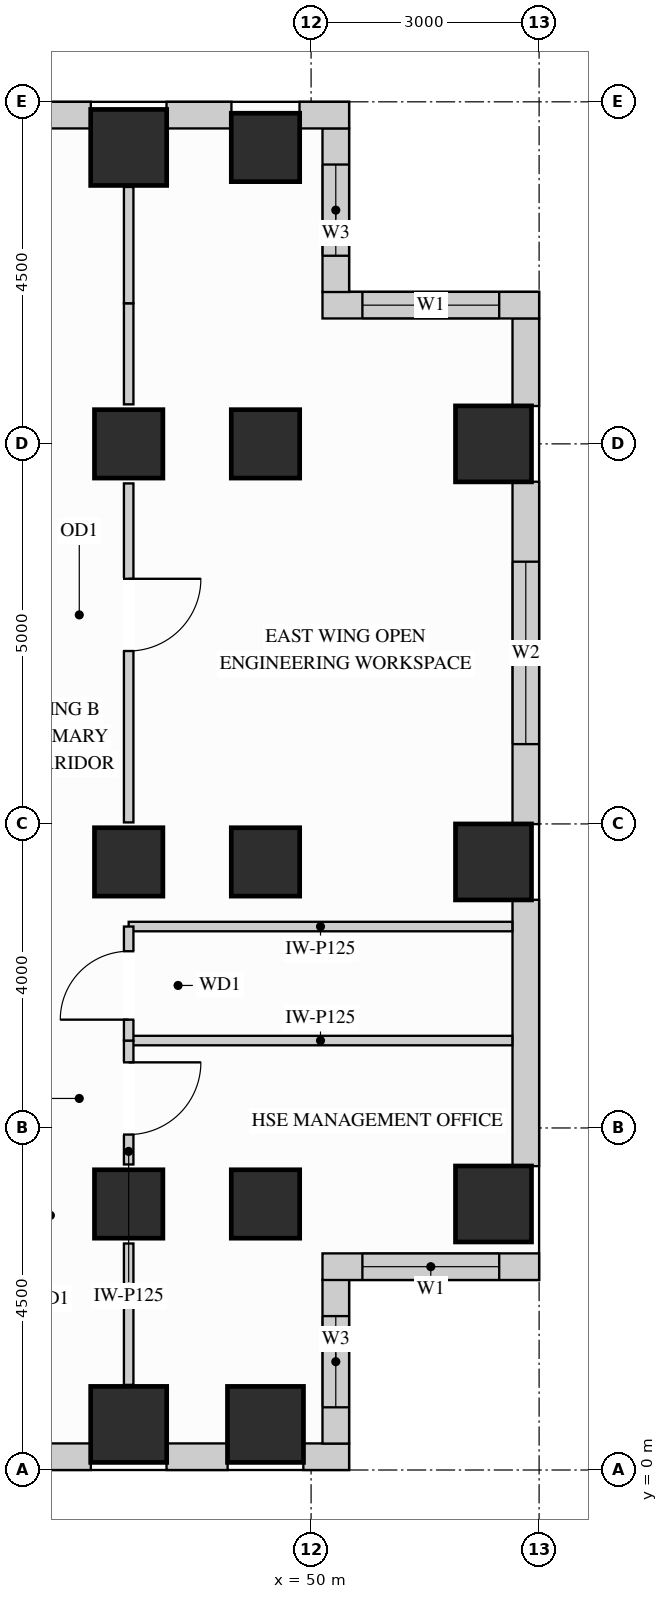
"""IFC4 building model, lengths in metres.
Left out: names, types, materials, properties, quantities, classifications, styles, units other than length and angle.
Written with IfcOpenShell. Run it as: python <this file> out.ifc"""

import sys

from ifc_helpers import new_model, si_unit, direction, frame, frame_2d, origin, origin_2d, place, context, subcontext, project, spatial, rectangle, extrude, source, transform, mapped, element, fill, save


model = new_model("IFC4")
c1 = context("Model", 3, precision=1e-05, world=origin(), true_north=direction((0.0, 1.0)))
c2 = subcontext(c1, "Body", "Model", "MODEL_VIEW")
j1 = project(units=[si_unit("LENGTHUNIT", "METRE"), si_unit("PLANEANGLEUNIT", "RADIAN")], contexts=[c1])
p1 = place(None, origin())
s1 = spatial("IfcSite", under=j1, at=p1, CompositionType="ELEMENT")
p2 = place(p1, origin())
s2 = spatial("IfcBuilding", under=s1, at=p2, CompositionType="ELEMENT")
p3 = place(p2, frame((0.0, 0.0, 182.7)))
s3 = spatial("IfcBuildingStorey", under=s2, at=p3, CompositionType="ELEMENT", Elevation=182.7)
m1 = source(origin(), c2, "Body", "SweptSolid", [
    extrude(rectangle(XDim=0.9, YDim=0.9, at=origin_2d()), origin(), (0.0, 0.0, 1.0), 3.4),
])
for number, where, z_axis, x_axis in (
    (1, (47.6, 13.5, 0.0), (0.0, 0.0, 1.0), (1.0, 0.0, 0.0)),
    (2, (47.6, 3.5, 0.0), (0.0, 0.0, 1.0), (1.0, 0.0, 0.0)),
    (3, (47.6, 8.0, 0.0), (0.0, 0.0, 1.0), (1.0, 0.0, 0.0)),
    (4, (49.4, 13.5, 0.0), (0.0, 0.0, 1.0), (1.0, 0.0, 0.0)),
    (5, (49.4, 17.4, 0.0), (0.0, 0.0, 1.0), (1.0, 0.0, 0.0)),
    (6, (49.4, 3.5, 0.0), (0.0, 0.0, 1.0), (1.0, 0.0, 0.0)),
    (7, (49.4, 8.0, 0.0), (0.0, 0.0, 1.0), (1.0, 0.0, 0.0)),
):
    element("IfcColumn", number, at=place(p3, frame(where, z_axis=z_axis, x_axis=x_axis)), inside=s3, PredefinedType="COLUMN", context=c2, shape_type="MappedRepresentation", body=[
        mapped(m1, transform((0.0, 0.0, 0.0), x_axis=(1.0, 0.0, 0.0), y_axis=(0.0, 1.0, 0.0), z_axis=(0.0, 0.0, 1.0))),
    ])
m2 = source(origin(), c2, "Body", "SweptSolid", [
    extrude(rectangle(XDim=1.0, YDim=1.0, at=origin_2d()), origin(), (0.0, 0.0, 1.0), 3.4),
])
for number, where, z_axis, x_axis in (
    (8, (47.6, 17.4, 0.0), (0.0, 0.0, 1.0), (1.0, 0.0, 0.0)),
    (9, (52.4, 13.5, 0.0), (0.0, 0.0, 1.0), (1.0, 0.0, 0.0)),
    (10, (52.4, 3.5, 0.0), (0.0, 0.0, 1.0), (1.0, 0.0, 0.0)),
    (11, (52.4, 8.0, 0.0), (0.0, 0.0, 1.0), (1.0, 0.0, 0.0)),
    (12, (47.6, 0.6, 0.0), (0.0, 0.0, 1.0), (1.0, 0.0, 0.0)),
    (13, (49.4, 0.6, 0.0), (0.0, 0.0, 1.0), (1.0, 0.0, 0.0)),
):
    element("IfcColumn", number, at=place(p3, frame(where, z_axis=z_axis, x_axis=x_axis)), inside=s3, PredefinedType="COLUMN", context=c2, shape_type="MappedRepresentation", body=[
        mapped(m2, transform((0.0, 0.0, 0.0), x_axis=(1.0, 0.0, 0.0), y_axis=(0.0, 1.0, 0.0), z_axis=(0.0, 0.0, 1.0))),
    ])
p4 = place(p3, frame((40.498, 0.175, 0.0), z_axis=(0.0, 0.0, 1.0), x_axis=(1.0, 0.0, 0.0)))
e14 = element("IfcWall", 14, at=p4, inside=s3, PredefinedType="SOLIDWALL", context=c2, shape_type="SweptSolid", body=[
    extrude(rectangle(XDim=6.604, YDim=0.35, at=frame_2d((3.302, 0.0))), origin(), (0.0, 0.0, 1.0), 2.612),
])
p5 = place(p4, frame((0.737, 0.0, 0.78)))
e15 = element("IfcOpeningElement", 15, at=p5, cuts=e14, PredefinedType="OPENING", context=c2, shape_type="SweptSolid", body=[
    extrude(rectangle(XDim=1.8, YDim=1.652, at=frame_2d((0.9, 0.826))), frame((0.0, 0.185, 0.0), z_axis=(0.0, -1.0, 0.0), x_axis=(1.0, 0.0, 0.0)), (0.0, 0.0, 1.0), 0.37),
])
p6 = place(p4, frame((2.955, 0.0, 0.78)))
e16 = element("IfcOpeningElement", 16, at=p6, cuts=e14, PredefinedType="OPENING", context=c2, shape_type="SweptSolid", body=[
    extrude(rectangle(XDim=1.8, YDim=1.652, at=frame_2d((0.9, 0.826))), frame((0.0, 0.185, 0.0), z_axis=(0.0, -1.0, 0.0), x_axis=(1.0, 0.0, 0.0)), (0.0, 0.0, 1.0), 0.37),
])
m3 = source(origin(), c2, "Body", "SweptSolid", [
    extrude(rectangle(XDim=0.804, YDim=0.35, at=frame_2d((0.402, 0.0))), origin(), (0.0, 0.0, 1.0), 3.385),
])
p7 = place(p3, frame((48.098, 0.175, 0.0), z_axis=(0.0, 0.0, 1.0), x_axis=(1.0, 0.0, 0.0)))
e17 = element("IfcWall", 17, at=p7, inside=s3, PredefinedType="SOLIDWALL", context=c2, shape_type="MappedRepresentation", body=[
    mapped(m3, transform((0.0, 0.0, 0.0), x_axis=(1.0, 0.0, 0.0), y_axis=(0.0, 1.0, 0.0), z_axis=(0.0, 0.0, 1.0))),
])
m4 = source(origin(), c2, "Body", "SweptSolid", [
    extrude(rectangle(XDim=0.602, YDim=0.35, at=frame_2d((0.301, 0.0))), origin(), (0.0, 0.0, 1.0), 3.385),
])
p8 = place(p3, frame((49.898, 0.175, 0.0), z_axis=(0.0, 0.0, 1.0), x_axis=(1.0, 0.0, 0.0)))
e18 = element("IfcWall", 18, at=p8, inside=s3, PredefinedType="SOLIDWALL", context=c2, shape_type="MappedRepresentation", body=[
    mapped(m4, transform((0.0, 0.0, 0.0), x_axis=(1.0, 0.0, 0.0), y_axis=(0.0, 1.0, 0.0), z_axis=(0.0, 0.0, 1.0))),
])
p9 = place(p3, frame((50.325, 0.348, 0.0), z_axis=(0.0, 0.0, 1.0), x_axis=(0.0, 1.0, 0.0)))
e19 = element("IfcWall", 19, at=p9, inside=s3, PredefinedType="SOLIDWALL", context=c2, shape_type="SweptSolid", body=[
    extrude(rectangle(XDim=2.154, YDim=0.35, at=frame_2d((1.077, 0.0))), origin(), (0.0, 0.0, 1.0), 3.385),
])
p10 = place(p9, frame((0.477, 0.0, 0.78)))
e20 = element("IfcOpeningElement", 20, at=p10, cuts=e19, PredefinedType="OPENING", context=c2, shape_type="SweptSolid", body=[
    extrude(rectangle(XDim=1.2, YDim=2.1, at=frame_2d((0.6, 1.05))), frame((0.0, 0.185, 0.0), z_axis=(0.0, -1.0, 0.0), x_axis=(1.0, 0.0, 0.0)), (0.0, 0.0, 1.0), 0.37),
])
p11 = place(p3, frame((50.15, 2.675, 0.0), z_axis=(0.0, 0.0, 1.0), x_axis=(1.0, 0.0, 0.0)))
e21 = element("IfcWall", 21, at=p11, inside=s3, PredefinedType="SOLIDWALL", context=c2, shape_type="SweptSolid", body=[
    extrude(rectangle(XDim=2.85, YDim=0.35, at=frame_2d((1.425, 0.0))), origin(), (0.0, 0.0, 1.0), 3.385),
])
p12 = place(p11, frame((0.525, 0.0, 0.78)))
e22 = element("IfcOpeningElement", 22, at=p12, cuts=e21, PredefinedType="OPENING", context=c2, shape_type="SweptSolid", body=[
    extrude(rectangle(XDim=1.8, YDim=2.1, at=frame_2d((0.9, 1.05))), frame((0.0, 0.185, 0.0), z_axis=(0.0, -1.0, 0.0), x_axis=(1.0, 0.0, 0.0)), (0.0, 0.0, 1.0), 0.37),
])
m5 = source(origin(), c2, "Body", "SweptSolid", [
    extrude(rectangle(XDim=3.504, YDim=0.35, at=frame_2d((1.752, 0.0))), origin(), (0.0, 0.0, 1.0), 2.612),
])
p13 = place(p3, frame((52.825, 3.998, 0.0), z_axis=(0.0, 0.0, 1.0), x_axis=(0.0, 1.0, 0.0)))
e23 = element("IfcWall", 23, at=p13, inside=s3, PredefinedType="SOLIDWALL", context=c2, shape_type="MappedRepresentation", body=[
    mapped(m5, transform((0.0, 0.0, 0.0), x_axis=(1.0, 0.0, 0.0), y_axis=(0.0, 1.0, 0.0), z_axis=(0.0, 0.0, 1.0))),
])
p14 = place(p3, frame((52.825, 8.498, 0.0), z_axis=(0.0, 0.0, 1.0), x_axis=(0.0, 1.0, 0.0)))
e24 = element("IfcWall", 24, at=p14, inside=s3, PredefinedType="SOLIDWALL", context=c2, shape_type="SweptSolid", body=[
    extrude(rectangle(XDim=4.504, YDim=0.35, at=frame_2d((2.252, 0.0))), origin(), (0.0, 0.0, 1.0), 2.612),
])
p15 = place(p14, frame((1.052, 0.0, 0.78)))
e25 = element("IfcOpeningElement", 25, at=p15, cuts=e24, PredefinedType="OPENING", context=c2, shape_type="SweptSolid", body=[
    extrude(rectangle(XDim=2.4, YDim=1.652, at=frame_2d((1.2, 0.826))), frame((0.0, 0.185, 0.0), z_axis=(0.0, -1.0, 0.0), x_axis=(1.0, 0.0, 0.0)), (0.0, 0.0, 1.0), 0.37),
])
m6 = source(origin(), c2, "Body", "SweptSolid", [
    extrude(rectangle(XDim=1.154, YDim=0.35, at=frame_2d((0.577, 0.0))), origin(), (0.0, 0.0, 1.0), 3.385),
])
p16 = place(p3, frame((52.825, 13.998, 0.0), z_axis=(0.0, 0.0, 1.0), x_axis=(0.0, 1.0, 0.0)))
e26 = element("IfcWall", 26, at=p16, inside=s3, PredefinedType="SOLIDWALL", context=c2, shape_type="MappedRepresentation", body=[
    mapped(m6, transform((0.0, 0.0, 0.0), x_axis=(1.0, 0.0, 0.0), y_axis=(0.0, 1.0, 0.0), z_axis=(0.0, 0.0, 1.0))),
])
p17 = place(p3, frame((53.0, 15.325, 0.0), z_axis=(0.0, 0.0, 1.0), x_axis=(-1.0, 0.0, 0.0)))
e27 = element("IfcWall", 27, at=p17, inside=s3, PredefinedType="SOLIDWALL", context=c2, shape_type="SweptSolid", body=[
    extrude(rectangle(XDim=2.85, YDim=0.35, at=frame_2d((1.425, 0.0))), origin(), (0.0, 0.0, 1.0), 3.385),
])
p18 = place(p17, frame((0.525, 0.0, 0.78)))
e28 = element("IfcOpeningElement", 28, at=p18, cuts=e27, PredefinedType="OPENING", context=c2, shape_type="SweptSolid", body=[
    extrude(rectangle(XDim=1.8, YDim=2.1, at=frame_2d((0.9, 1.05))), frame((0.0, 0.185, 0.0), z_axis=(0.0, -1.0, 0.0), x_axis=(1.0, 0.0, 0.0)), (0.0, 0.0, 1.0), 0.37),
])
p19 = place(p3, frame((50.325, 15.498, 0.0), z_axis=(0.0, 0.0, 1.0), x_axis=(0.0, 1.0, 0.0)))
e29 = element("IfcWall", 29, at=p19, inside=s3, PredefinedType="SOLIDWALL", context=c2, shape_type="SweptSolid", body=[
    extrude(rectangle(XDim=2.154, YDim=0.35, at=frame_2d((1.077, 0.0))), origin(), (0.0, 0.0, 1.0), 3.385),
])
p20 = place(p19, frame((0.477, 0.0, 0.78)))
e30 = element("IfcOpeningElement", 30, at=p20, cuts=e29, PredefinedType="OPENING", context=c2, shape_type="SweptSolid", body=[
    extrude(rectangle(XDim=1.2, YDim=2.1, at=frame_2d((0.6, 1.05))), frame((0.0, 0.185, 0.0), z_axis=(0.0, -1.0, 0.0), x_axis=(1.0, 0.0, 0.0)), (0.0, 0.0, 1.0), 0.37),
])
m7 = source(origin(), c2, "Body", "SweptSolid", [
    extrude(rectangle(XDim=0.652, YDim=0.35, at=frame_2d((0.326, 0.0))), origin(), (0.0, 0.0, 1.0), 3.385),
])
p21 = place(p3, frame((50.5, 17.825, 0.0), z_axis=(0.0, 0.0, 1.0), x_axis=(-1.0, 0.0, 0.0)))
e31 = element("IfcWall", 31, at=p21, inside=s3, PredefinedType="SOLIDWALL", context=c2, shape_type="MappedRepresentation", body=[
    mapped(m7, transform((0.0, 0.0, 0.0), x_axis=(1.0, 0.0, 0.0), y_axis=(0.0, 1.0, 0.0), z_axis=(0.0, 0.0, 1.0))),
])
m8 = source(origin(), c2, "Body", "SweptSolid", [
    extrude(rectangle(XDim=0.854, YDim=0.35, at=frame_2d((0.427, 0.0))), origin(), (0.0, 0.0, 1.0), 3.385),
])
p22 = place(p3, frame((48.952, 17.825, 0.0), z_axis=(0.0, 0.0, 1.0), x_axis=(-1.0, 0.0, 0.0)))
e32 = element("IfcWall", 32, at=p22, inside=s3, PredefinedType="SOLIDWALL", context=c2, shape_type="MappedRepresentation", body=[
    mapped(m8, transform((0.0, 0.0, 0.0), x_axis=(1.0, 0.0, 0.0), y_axis=(0.0, 1.0, 0.0), z_axis=(0.0, 0.0, 1.0))),
])
p23 = place(p3, frame((47.102, 17.825, 0.0), z_axis=(0.0, 0.0, 1.0), x_axis=(-1.0, 0.0, 0.0)))
e33 = element("IfcWall", 33, at=p23, inside=s3, PredefinedType="SOLIDWALL", context=c2, shape_type="SweptSolid", body=[
    extrude(rectangle(XDim=6.604, YDim=0.35, at=frame_2d((3.302, 0.0))), origin(), (0.0, 0.0, 1.0), 2.612),
])
p24 = place(p23, frame((1.849, 0.0, 0.78)))
e34 = element("IfcOpeningElement", 34, at=p24, cuts=e33, PredefinedType="OPENING", context=c2, shape_type="SweptSolid", body=[
    extrude(rectangle(XDim=1.8, YDim=1.652, at=frame_2d((0.9, 0.826))), frame((0.0, 0.185, 0.0), z_axis=(0.0, -1.0, 0.0), x_axis=(1.0, 0.0, 0.0)), (0.0, 0.0, 1.0), 0.37),
])
p25 = place(p23, frame((4.067, 0.0, 0.78)))
e35 = element("IfcOpeningElement", 35, at=p25, cuts=e33, PredefinedType="OPENING", context=c2, shape_type="SweptSolid", body=[
    extrude(rectangle(XDim=1.8, YDim=1.652, at=frame_2d((0.9, 0.826))), frame((0.0, 0.185, 0.0), z_axis=(0.0, -1.0, 0.0), x_axis=(1.0, 0.0, 0.0)), (0.0, 0.0, 1.0), 0.37),
])
m9 = source(origin(), c2, "Body", "SweptSolid", [
    extrude(rectangle(XDim=5.048, YDim=0.125, at=frame_2d((2.524, 0.0))), origin(), (0.0, 0.0, 1.0), 3.385),
])
for number, where, z_axis, x_axis in (
    (36, (47.6, 5.65, 0.0), (0.0, 0.0, 1.0), (1.0, 0.0, 0.0)),
    (37, (47.6, 7.15, 0.0), (0.0, 0.0, 1.0), (1.0, 0.0, 0.0)),
):
    element("IfcWall", number, at=place(p3, frame(where, z_axis=z_axis, x_axis=x_axis)), inside=s3, PredefinedType="PARTITIONING", context=c2, shape_type="MappedRepresentation", body=[
        mapped(m9, transform((0.0, 0.0, 0.0), x_axis=(1.0, 0.0, 0.0), y_axis=(0.0, 1.0, 0.0), z_axis=(0.0, 0.0, 1.0))),
    ])
p26 = place(p3, frame((47.6, 4.02, 0.0), z_axis=(0.0, 0.0, 1.0), x_axis=(0.0, 1.0, 0.0)))
e38 = element("IfcWall", 38, at=p26, inside=s3, PredefinedType="PARTITIONING", context=c2, shape_type="SweptSolid", body=[
    extrude(rectangle(XDim=1.63, YDim=0.125, at=frame_2d((0.815, 0.0))), origin(), (0.0, 0.0, 1.0), 2.773),
])
p27 = place(p26, frame((0.393, 0.0, 0.0)))
e39 = element("IfcOpeningElement", 39, at=p27, cuts=e38, PredefinedType="OPENING", context=c2, shape_type="SweptSolid", body=[
    extrude(rectangle(XDim=0.95, YDim=2.15, at=frame_2d((0.475, 1.075))), frame((0.0, 0.073, 0.0), z_axis=(0.0, -1.0, 0.0), x_axis=(1.0, 0.0, 0.0)), (0.0, 0.0, 1.0), 0.145),
])
m10 = source(origin(), c2, "Body", "SweptSolid", [
    extrude(rectangle(XDim=1.86, YDim=0.125, at=frame_2d((0.93, 0.0))), origin(), (0.0, 0.0, 1.0), 2.773),
])
p28 = place(p3, frame((47.6, 1.12, 0.0), z_axis=(0.0, 0.0, 1.0), x_axis=(0.0, 1.0, 0.0)))
e40 = element("IfcWall", 40, at=p28, inside=s3, PredefinedType="PARTITIONING", context=c2, shape_type="MappedRepresentation", body=[
    mapped(m10, transform((0.0, 0.0, 0.0), x_axis=(1.0, 0.0, 0.0), y_axis=(0.0, 1.0, 0.0), z_axis=(0.0, 0.0, 1.0))),
])
p29 = place(p3, frame((47.6, 8.52, 0.0), z_axis=(0.0, 0.0, 1.0), x_axis=(0.0, 1.0, 0.0)))
e41 = element("IfcWall", 41, at=p29, inside=s3, PredefinedType="PARTITIONING", context=c2, shape_type="SweptSolid", body=[
    extrude(rectangle(XDim=4.46, YDim=0.125, at=frame_2d((2.23, 0.0))), origin(), (0.0, 0.0, 1.0), 2.773),
])
p30 = place(p29, frame((2.255, 0.0, 0.0)))
e42 = element("IfcOpeningElement", 42, at=p30, cuts=e41, PredefinedType="OPENING", context=c2, shape_type="SweptSolid", body=[
    extrude(rectangle(XDim=0.95, YDim=2.15, at=frame_2d((0.475, 1.075))), frame((0.0, 0.073, 0.0), z_axis=(0.0, -1.0, 0.0), x_axis=(1.0, 0.0, 0.0)), (0.0, 0.0, 1.0), 0.145),
])
m11 = source(origin(), c2, "Body", "SweptSolid", [
    extrude(rectangle(XDim=1.33, YDim=0.125, at=frame_2d((0.665, 0.0))), origin(), (0.0, 0.0, 1.0), 2.773),
])
p31 = place(p3, frame((47.6, 14.02, 0.0), z_axis=(0.0, 0.0, 1.0), x_axis=(0.0, 1.0, 0.0)))
e43 = element("IfcWall", 43, at=p31, inside=s3, PredefinedType="PARTITIONING", context=c2, shape_type="MappedRepresentation", body=[
    mapped(m11, transform((0.0, 0.0, 0.0), x_axis=(1.0, 0.0, 0.0), y_axis=(0.0, 1.0, 0.0), z_axis=(0.0, 0.0, 1.0))),
])
m12 = source(origin(), c2, "Body", "SweptSolid", [
    extrude(rectangle(XDim=1.53, YDim=0.125, at=frame_2d((0.765, 0.0))), origin(), (0.0, 0.0, 1.0), 2.773),
])
p32 = place(p3, frame((47.6, 15.35, 0.0), z_axis=(0.0, 0.0, 1.0), x_axis=(0.0, 1.0, 0.0)))
e44 = element("IfcWall", 44, at=p32, inside=s3, PredefinedType="PARTITIONING", context=c2, shape_type="MappedRepresentation", body=[
    mapped(m12, transform((0.0, 0.0, 0.0), x_axis=(1.0, 0.0, 0.0), y_axis=(0.0, 1.0, 0.0), z_axis=(0.0, 0.0, 1.0))),
])
p33 = place(p3, frame((47.6, 5.65, 0.0), z_axis=(0.0, 0.0, 1.0), x_axis=(0.0, 1.0, 0.0)))
e45 = element("IfcWall", 45, at=p33, inside=s3, PredefinedType="PARTITIONING", context=c2, shape_type="SweptSolid", body=[
    extrude(rectangle(XDim=1.5, YDim=0.125, at=frame_2d((0.75, 0.0))), origin(), (0.0, 0.0, 1.0), 2.773),
])
p34 = place(p33, frame((0.275, 0.0, 0.0)))
e46 = element("IfcOpeningElement", 46, at=p34, cuts=e45, PredefinedType="OPENING", context=c2, shape_type="SweptSolid", body=[
    extrude(rectangle(XDim=0.9, YDim=2.15, at=frame_2d((0.45, 1.075))), frame((0.0, 0.073, 0.0), z_axis=(0.0, -1.0, 0.0), x_axis=(1.0, 0.0, 0.0)), (0.0, 0.0, 1.0), 0.145),
])
m13 = source(origin(), c2, "Body", "SweptSolid", [
    extrude(rectangle(XDim=0.95, YDim=2.15, at=frame_2d((0.475, 1.075))), frame((0.0, 0.025, 0.0), z_axis=(0.0, -1.0, 0.0), x_axis=(1.0, 0.0, 0.0)), (0.0, 0.0, 1.0), 0.05),
])
p35 = place(p27, origin())
e47 = element("IfcDoor", 47, at=p35, inside=s3, OperationType="SINGLE_SWING_RIGHT", PredefinedType="DOOR", context=c2, shape_type="MappedRepresentation", body=[
    mapped(m13, transform((0.0, 0.0, 0.0), x_axis=(1.0, 0.0, 0.0), y_axis=(0.0, 1.0, 0.0), z_axis=(0.0, 0.0, 1.0))),
])
fill(e39, e47)
p36 = place(p30, origin())
e48 = element("IfcDoor", 48, at=p36, inside=s3, OperationType="SINGLE_SWING_RIGHT", PredefinedType="DOOR", context=c2, shape_type="MappedRepresentation", body=[
    mapped(m13, transform((0.0, 0.0, 0.0), x_axis=(1.0, 0.0, 0.0), y_axis=(0.0, 1.0, 0.0), z_axis=(0.0, 0.0, 1.0))),
])
fill(e42, e48)
m14 = source(origin(), c2, "Body", "SweptSolid", [
    extrude(rectangle(XDim=0.9, YDim=2.15, at=frame_2d((0.45, 1.075))), frame((0.0, 0.025, 0.0), z_axis=(0.0, -1.0, 0.0), x_axis=(1.0, 0.0, 0.0)), (0.0, 0.0, 1.0), 0.05),
])
p37 = place(p34, origin())
e49 = element("IfcDoor", 49, at=p37, inside=s3, OperationType="SINGLE_SWING_LEFT", PredefinedType="DOOR", context=c2, shape_type="MappedRepresentation", body=[
    mapped(m14, transform((0.0, 0.0, 0.0), x_axis=(1.0, 0.0, 0.0), y_axis=(0.0, 1.0, 0.0), z_axis=(0.0, 0.0, 1.0))),
])
fill(e46, e49)
m15 = source(origin(), c2, "Body", "SweptSolid", [
    extrude(rectangle(XDim=1.8, YDim=2.1, at=frame_2d((0.9, 1.05))), frame((0.0, 0.03, 0.0), z_axis=(0.0, -1.0, 0.0), x_axis=(1.0, 0.0, 0.0)), (0.0, 0.0, 1.0), 0.06),
])
p38 = place(p12, origin())
e50 = element("IfcWindow", 50, at=p38, inside=s3, PartitioningType="SINGLE_PANEL", PredefinedType="WINDOW", context=c2, shape_type="MappedRepresentation", body=[
    mapped(m15, transform((0.0, 0.0, 0.0), x_axis=(1.0, 0.0, 0.0), y_axis=(0.0, 1.0, 0.0), z_axis=(0.0, 0.0, 1.0))),
])
fill(e22, e50)
p39 = place(p18, origin())
e51 = element("IfcWindow", 51, at=p39, inside=s3, PartitioningType="SINGLE_PANEL", PredefinedType="WINDOW", context=c2, shape_type="MappedRepresentation", body=[
    mapped(m15, transform((0.0, 0.0, 0.0), x_axis=(1.0, 0.0, 0.0), y_axis=(0.0, 1.0, 0.0), z_axis=(0.0, 0.0, 1.0))),
])
fill(e28, e51)
m16 = source(origin(), c2, "Body", "SweptSolid", [
    extrude(rectangle(XDim=2.4, YDim=1.652, at=frame_2d((1.2, 0.826))), frame((0.0, 0.03, 0.0), z_axis=(0.0, -1.0, 0.0), x_axis=(1.0, 0.0, 0.0)), (0.0, 0.0, 1.0), 0.06),
])
p40 = place(p15, origin())
e52 = element("IfcWindow", 52, at=p40, inside=s3, PartitioningType="SINGLE_PANEL", PredefinedType="WINDOW", context=c2, shape_type="MappedRepresentation", body=[
    mapped(m16, transform((0.0, 0.0, 0.0), x_axis=(1.0, 0.0, 0.0), y_axis=(0.0, 1.0, 0.0), z_axis=(0.0, 0.0, 1.0))),
])
fill(e25, e52)
m17 = source(origin(), c2, "Body", "SweptSolid", [
    extrude(rectangle(XDim=1.2, YDim=2.1, at=frame_2d((0.6, 1.05))), frame((0.0, 0.03, 0.0), z_axis=(0.0, -1.0, 0.0), x_axis=(1.0, 0.0, 0.0)), (0.0, 0.0, 1.0), 0.06),
])
p41 = place(p10, origin())
e53 = element("IfcWindow", 53, at=p41, inside=s3, PartitioningType="SINGLE_PANEL", PredefinedType="WINDOW", context=c2, shape_type="MappedRepresentation", body=[
    mapped(m17, transform((0.0, 0.0, 0.0), x_axis=(1.0, 0.0, 0.0), y_axis=(0.0, 1.0, 0.0), z_axis=(0.0, 0.0, 1.0))),
])
fill(e20, e53)
p42 = place(p20, origin())
e54 = element("IfcWindow", 54, at=p42, inside=s3, PartitioningType="SINGLE_PANEL", PredefinedType="WINDOW", context=c2, shape_type="MappedRepresentation", body=[
    mapped(m17, transform((0.0, 0.0, 0.0), x_axis=(1.0, 0.0, 0.0), y_axis=(0.0, 1.0, 0.0), z_axis=(0.0, 0.0, 1.0))),
])
fill(e30, e54)
save(model, sys.argv[1])
